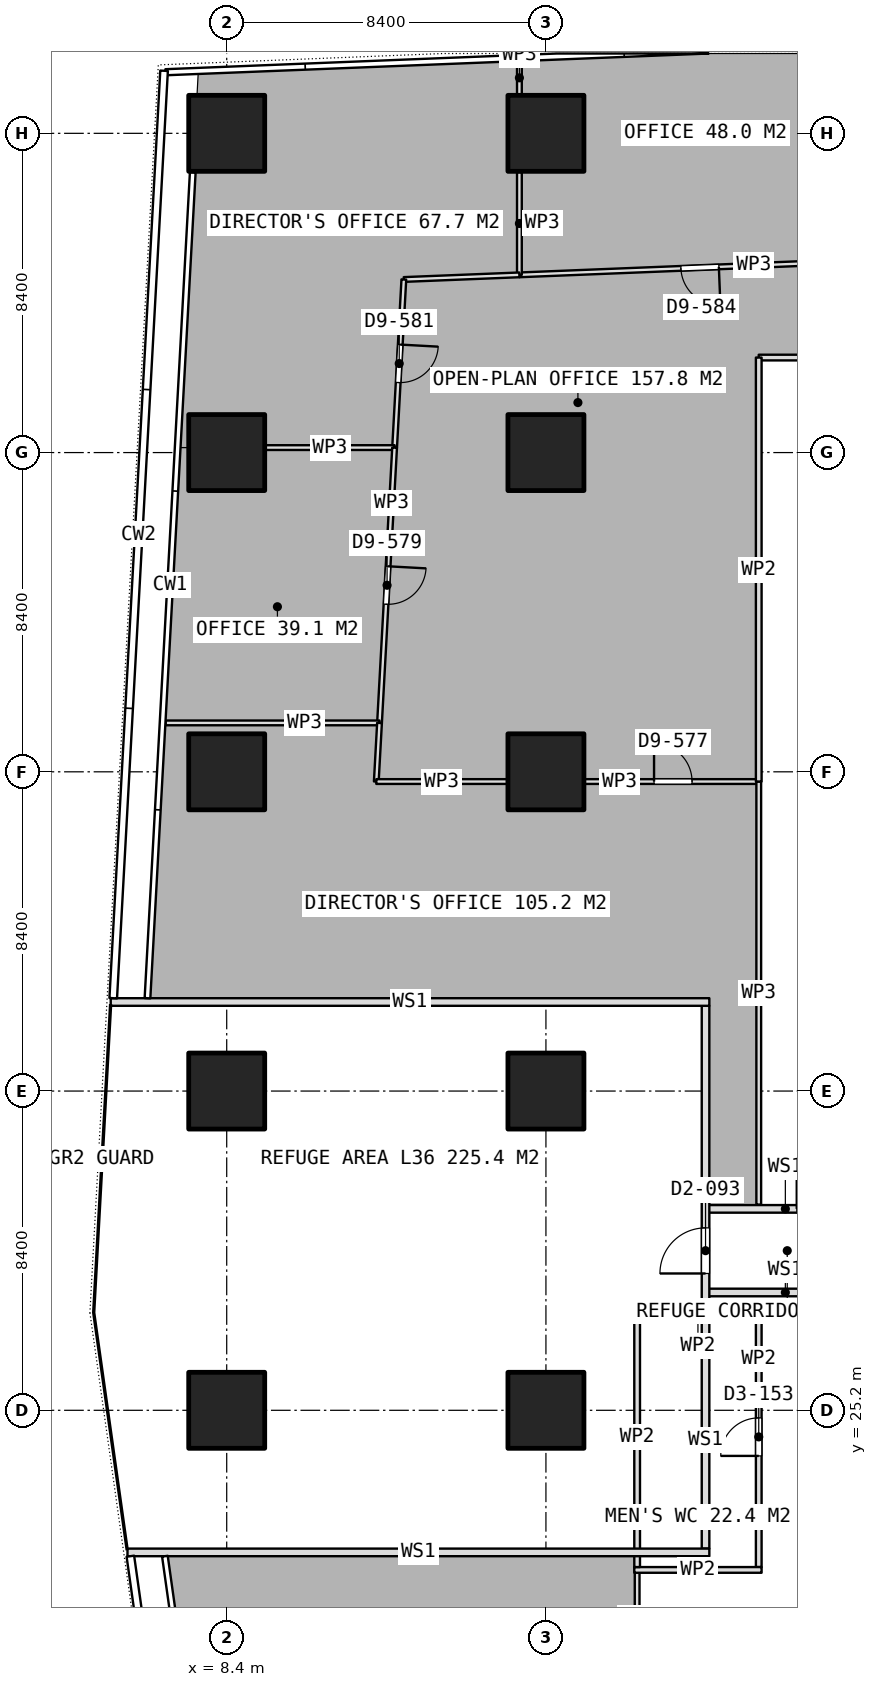
"""IFC4 building model, lengths in metres.
Left out: names, types, materials, properties, quantities, classifications, styles, units other than length and angle.
Written with IfcOpenShell. Run it as: python <this file> out.ifc"""

import sys

from ifc_helpers import new_model, si_unit, direction, frame, frame_2d, origin, origin_2d, place, context, subcontext, project, spatial, rectangle, extrude, element, fill, save


model = new_model("IFC4")
c1 = context("Model", 3, precision=1e-05, world=origin(), true_north=direction((0.0, 1.0)))
c2 = subcontext(c1, "Body", "Model", "MODEL_VIEW")
j1 = project(units=[si_unit("LENGTHUNIT", "METRE"), si_unit("PLANEANGLEUNIT", "RADIAN")], contexts=[c1])
p1 = place(None, origin())
s1 = spatial("IfcSite", under=j1, at=p1, CompositionType="ELEMENT")
p2 = place(p1, origin())
s2 = spatial("IfcBuilding", under=s1, at=p2, CompositionType="ELEMENT")
p3 = place(p2, frame((0.0, 0.0, 144.05)))
s3 = spatial("IfcBuildingStorey", under=s2, at=p3, CompositionType="ELEMENT", Elevation=144.05)
for number, where, z_axis, x_axis in (
    (1, (8.4, 25.2, 0.0), (0.0, 0.0, 1.0), (1.0, 0.0, 0.0)),
    (2, (8.4, 33.6, 0.0), (0.0, 0.0, 1.0), (1.0, 0.0, 0.0)),
    (3, (8.4, 42.0, 0.0), (0.0, 0.0, 1.0), (1.0, 0.0, 0.0)),
    (4, (8.4, 50.4, 0.0), (0.0, 0.0, 1.0), (1.0, 0.0, 0.0)),
    (5, (8.4, 58.8, 0.0), (0.0, 0.0, 1.0), (1.0, 0.0, 0.0)),
    (6, (16.8, 25.2, 0.0), (0.0, 0.0, 1.0), (1.0, 0.0, 0.0)),
    (7, (16.8, 33.6, 0.0), (0.0, 0.0, 1.0), (1.0, 0.0, 0.0)),
    (8, (16.8, 42.0, 0.0), (0.0, 0.0, 1.0), (1.0, 0.0, 0.0)),
    (9, (16.8, 50.4, 0.0), (0.0, 0.0, 1.0), (1.0, 0.0, 0.0)),
    (10, (16.8, 58.8, 0.0), (0.0, 0.0, 1.0), (1.0, 0.0, 0.0)),
):
    element("IfcColumn", number, at=place(p3, frame(where, z_axis=z_axis, x_axis=x_axis)), inside=s3, PredefinedType="COLUMN", context=c2, shape_type="SweptSolid", body=[
        extrude(rectangle(XDim=2.0, YDim=2.0, at=origin_2d()), origin(), (0.0, 0.0, 1.0), 3.75),
    ])
for number, where, z_axis, x_axis in (
    (11, (19.125, 21.0, 0.0), (0.0, 0.0, 1.0), (1.0, 0.0, 0.0)),
    (12, (19.125, 28.0, 0.0), (0.0, 0.0, 1.0), (1.0, 0.0, 0.0)),
):
    element("IfcWall", number, at=place(p3, frame(where, z_axis=z_axis, x_axis=x_axis)), inside=s3, PredefinedType="PARTITIONING", context=c2, shape_type="SweptSolid", body=[
        extrude(rectangle(XDim=3.35, YDim=0.15, at=frame_2d((1.675, 0.0))), origin(), (0.0, 0.0, 1.0), 3.5),
    ])
p4 = place(p3, frame((19.2, 21.075, 0.0), z_axis=(0.0, 0.0, 1.0), x_axis=(0.0, 1.0, 0.0)))
e13 = element("IfcWall", 13, at=p4, inside=s3, PredefinedType="PARTITIONING", context=c2, shape_type="SweptSolid", body=[
    extrude(rectangle(XDim=6.85, YDim=0.15, at=frame_2d((3.425, 0.0))), origin(), (0.0, 0.0, 1.0), 3.5),
])
p5 = place(p3, frame((22.4, 21.075, 0.0), z_axis=(0.0, 0.0, 1.0), x_axis=(0.0, 1.0, 0.0)))
e14 = element("IfcWall", 14, at=p5, inside=s3, PredefinedType="PARTITIONING", context=c2, shape_type="SweptSolid", body=[
    extrude(rectangle(XDim=6.85, YDim=0.15, at=frame_2d((3.425, 0.0))), origin(), (0.0, 0.0, 1.0), 3.5),
])
p6 = place(p5, frame((2.925, 0.0, 0.0)))
e15 = element("IfcOpeningElement", 15, at=p6, cuts=e14, PredefinedType="OPENING", context=c2, shape_type="SweptSolid", body=[
    extrude(rectangle(XDim=1.0, YDim=2.1, at=frame_2d((0.5, 1.05))), frame((0.0, 0.085, 0.0), z_axis=(0.0, -1.0, 0.0), x_axis=(1.0, 0.0, 0.0)), (0.0, 0.0, 1.0), 0.17),
])
p7 = place(p3, frame((19.2, 21.074, 0.0), z_axis=(0.0, 0.0, 1.0), x_axis=(0.0, -1.0, 0.0)))
e16 = element("IfcWall", 16, at=p7, inside=s3, PredefinedType="PARTITIONING", context=c2, shape_type="SweptSolid", body=[
    extrude(rectangle(XDim=2.674, YDim=0.125, at=frame_2d((1.337, 0.0))), origin(), (0.0, 0.0, 1.0), 3.5),
])
p8 = place(p3, frame((25.599, 55.457, 0.0), z_axis=(0.0, 0.0, 1.0), x_axis=(-0.999195821447, -0.040096264197, 0.0)))
e17 = element("IfcWall", 17, at=p8, inside=s3, PredefinedType="PARTITIONING", context=c2, shape_type="SweptSolid", body=[
    extrude(rectangle(XDim=9.505, YDim=0.125, at=frame_2d((4.752, 0.0))), origin(), (0.0, 0.0, 1.0), 3.5),
])
p9 = place(p8, frame((4.252, 0.0, 0.0)))
e18 = element("IfcOpeningElement", 18, at=p9, cuts=e17, PredefinedType="OPENING", context=c2, shape_type="SweptSolid", body=[
    extrude(rectangle(XDim=1.0, YDim=2.1, at=frame_2d((0.5, 1.05))), frame((0.0, 0.073, 0.0), z_axis=(0.0, -1.0, 0.0), x_axis=(1.0, 0.0, 0.0)), (0.0, 0.0, 1.0), 0.145),
])
p10 = place(p3, frame((16.102, 55.076, 0.0), z_axis=(0.0, 0.0, 1.0), x_axis=(0.0, 1.0, 0.0)))
e19 = element("IfcWall", 19, at=p10, inside=s3, PredefinedType="PARTITIONING", context=c2, shape_type="SweptSolid", body=[
    extrude(rectangle(XDim=2.704, YDim=0.125, at=frame_2d((1.352, 0.0))), origin(), (0.0, 0.0, 1.0), 3.5),
])
p11 = place(p3, frame((16.102, 59.82, 0.0), z_axis=(0.0, 0.0, 1.0), x_axis=(0.0, 1.0, 0.0)))
e20 = element("IfcWall", 20, at=p11, inside=s3, PredefinedType="PARTITIONING", context=c2, shape_type="SweptSolid", body=[
    extrude(rectangle(XDim=0.88, YDim=0.125, at=frame_2d((0.44, 0.0))), origin(), (0.0, 0.0, 1.0), 3.5),
])
p12 = place(p3, frame((16.101, 55.076, 0.0), z_axis=(0.0, 0.0, 1.0), x_axis=(-0.999198007742, -0.040041744769, 0.0)))
e21 = element("IfcWall", 21, at=p12, inside=s3, PredefinedType="PARTITIONING", context=c2, shape_type="SweptSolid", body=[
    extrude(rectangle(XDim=3.042, YDim=0.125, at=frame_2d((1.521, 0.0))), origin(), (0.0, 0.0, 1.0), 3.5),
])
p13 = place(p3, frame((13.061, 54.954, 0.0), z_axis=(0.0, 0.0, 1.0), x_axis=(-0.054838150919, -0.998495256475, 0.0)))
e22 = element("IfcWall", 22, at=p13, inside=s3, PredefinedType="PARTITIONING", context=c2, shape_type="SweptSolid", body=[
    extrude(rectangle(XDim=4.43, YDim=0.125, at=frame_2d((2.215, 0.0))), origin(), (0.0, 0.0, 1.0), 3.5),
])
p14 = place(p13, frame((1.715, 0.0, 0.0)))
e23 = element("IfcOpeningElement", 23, at=p14, cuts=e22, PredefinedType="OPENING", context=c2, shape_type="SweptSolid", body=[
    extrude(rectangle(XDim=1.0, YDim=2.1, at=frame_2d((0.5, 1.05))), frame((0.0, 0.073, 0.0), z_axis=(0.0, -1.0, 0.0), x_axis=(1.0, 0.0, 0.0)), (0.0, 0.0, 1.0), 0.145),
])
p15 = place(p3, frame((12.818, 50.531, 0.0), z_axis=(0.0, 0.0, 1.0), x_axis=(-1.0, 0.0, 0.0)))
e24 = element("IfcWall", 24, at=p15, inside=s3, PredefinedType="PARTITIONING", context=c2, shape_type="SweptSolid", body=[
    extrude(rectangle(XDim=3.398, YDim=0.125, at=frame_2d((1.699, 0.0))), origin(), (0.0, 0.0, 1.0), 3.5),
])
p16 = place(p3, frame((12.818, 50.53, 0.0), z_axis=(0.0, 0.0, 1.0), x_axis=(-0.054759793003, -0.99849955687, 0.0)))
e25 = element("IfcWall", 25, at=p16, inside=s3, PredefinedType="PARTITIONING", context=c2, shape_type="SweptSolid", body=[
    extrude(rectangle(XDim=7.254, YDim=0.125, at=frame_2d((3.627, 0.0))), origin(), (0.0, 0.0, 1.0), 3.5),
])
p17 = place(p16, frame((3.127, 0.0, 0.0)))
e26 = element("IfcOpeningElement", 26, at=p17, cuts=e25, PredefinedType="OPENING", context=c2, shape_type="SweptSolid", body=[
    extrude(rectangle(XDim=1.0, YDim=2.1, at=frame_2d((0.5, 1.05))), frame((0.0, 0.073, 0.0), z_axis=(0.0, -1.0, 0.0), x_axis=(1.0, 0.0, 0.0)), (0.0, 0.0, 1.0), 0.145),
])
p18 = place(p3, frame((12.421, 43.287, 0.0), z_axis=(0.0, 0.0, 1.0), x_axis=(-1.0, 0.0, 0.0)))
e27 = element("IfcWall", 27, at=p18, inside=s3, PredefinedType="PARTITIONING", context=c2, shape_type="SweptSolid", body=[
    extrude(rectangle(XDim=5.628, YDim=0.125, at=frame_2d((2.814, 0.0))), origin(), (0.0, 0.0, 1.0), 3.5),
])
p19 = place(p3, frame((12.421, 43.286, 0.0), z_axis=(0.0, 0.0, 1.0), x_axis=(-0.055014719624, -0.998485543523, 0.0)))
e28 = element("IfcWall", 28, at=p19, inside=s3, PredefinedType="PARTITIONING", context=c2, shape_type="SweptSolid", body=[
    extrude(rectangle(XDim=1.544, YDim=0.125, at=frame_2d((0.772, 0.0))), origin(), (0.0, 0.0, 1.0), 3.5),
])
p20 = place(p3, frame((12.336, 41.744, 0.0), z_axis=(0.0, 0.0, 1.0), x_axis=(1.0, 0.0, 0.0)))
e29 = element("IfcWall", 29, at=p20, inside=s3, PredefinedType="PARTITIONING", context=c2, shape_type="SweptSolid", body=[
    extrude(rectangle(XDim=3.444, YDim=0.125, at=frame_2d((1.722, 0.0))), origin(), (0.0, 0.0, 1.0), 3.5),
])
p21 = place(p3, frame((17.82, 41.744, 0.0), z_axis=(0.0, 0.0, 1.0), x_axis=(1.0, 0.0, 0.0)))
e30 = element("IfcWall", 30, at=p21, inside=s3, PredefinedType="PARTITIONING", context=c2, shape_type="SweptSolid", body=[
    extrude(rectangle(XDim=4.58, YDim=0.125, at=frame_2d((2.29, 0.0))), origin(), (0.0, 0.0, 1.0), 3.5),
])
p22 = place(p21, frame((1.825, 0.0, 0.0)))
e31 = element("IfcOpeningElement", 31, at=p22, cuts=e30, PredefinedType="OPENING", context=c2, shape_type="SweptSolid", body=[
    extrude(rectangle(XDim=1.0, YDim=2.1, at=frame_2d((0.5, 1.05))), frame((0.0, 0.073, 0.0), z_axis=(0.0, -1.0, 0.0), x_axis=(1.0, 0.0, 0.0)), (0.0, 0.0, 1.0), 0.145),
])
p23 = place(p3, frame((22.4, 41.744, 0.0), z_axis=(0.0, 0.0, 1.0), x_axis=(0.0, -1.0, 0.0)))
e32 = element("IfcWall", 32, at=p23, inside=s3, PredefinedType="PARTITIONING", context=c2, shape_type="SweptSolid", body=[
    extrude(rectangle(XDim=11.133, YDim=0.125, at=frame_2d((5.566, 0.0))), origin(), (0.0, 0.0, 1.0), 3.5),
])
p24 = place(p3, frame((33.826, 52.9, 0.0), z_axis=(0.0, 0.0, 1.0), x_axis=(-1.0, 0.0, 0.0)))
e33 = element("IfcWall", 33, at=p24, inside=s3, PredefinedType="PARTITIONING", context=c2, shape_type="SweptSolid", body=[
    extrude(rectangle(XDim=11.426, YDim=0.15, at=frame_2d((5.713, 0.0))), origin(), (0.0, 0.0, 1.0), 3.5),
])
p25 = place(p24, frame((5.213, 0.0, 0.0)))
e34 = element("IfcOpeningElement", 34, at=p25, cuts=e33, PredefinedType="OPENING", context=c2, shape_type="SweptSolid", body=[
    extrude(rectangle(XDim=1.0, YDim=2.1, at=frame_2d((0.5, 1.05))), frame((0.0, 0.085, 0.0), z_axis=(0.0, -1.0, 0.0), x_axis=(1.0, 0.0, 0.0)), (0.0, 0.0, 1.0), 0.17),
])
p26 = place(p3, frame((22.4, 52.9, 0.0), z_axis=(0.0, 0.0, 1.0), x_axis=(0.0, -1.0, 0.0)))
e35 = element("IfcWall", 35, at=p26, inside=s3, PredefinedType="PARTITIONING", context=c2, shape_type="SweptSolid", body=[
    extrude(rectangle(XDim=11.156, YDim=0.15, at=frame_2d((5.578, 0.0))), origin(), (0.0, 0.0, 1.0), 3.5),
])
p27 = place(p3, frame((21.0, 21.561, 0.0), z_axis=(0.0, 0.0, 1.0), x_axis=(0.0, 1.0, 0.0)))
e36 = element("IfcWall", 36, at=p27, inside=s3, PredefinedType="PARTITIONING", context=c2, shape_type="SweptSolid", body=[
    extrude(rectangle(XDim=14.282, YDim=0.2, at=frame_2d((7.141, 0.0))), origin(), (0.0, 0.0, 1.0), 3.5),
])
p28 = place(p27, frame((7.239, 0.0, 0.0)))
e37 = element("IfcOpeningElement", 37, at=p28, cuts=e36, PredefinedType="OPENING", context=c2, shape_type="SweptSolid", body=[
    extrude(rectangle(XDim=1.2, YDim=2.1, at=frame_2d((0.6, 1.05))), frame((0.0, 0.11, 0.0), z_axis=(0.0, -1.0, 0.0), x_axis=(1.0, 0.0, 0.0)), (0.0, 0.0, 1.0), 0.22),
])
p29 = place(p3, frame((5.789, 21.461, 0.0), z_axis=(0.0, 0.0, 1.0), x_axis=(1.0, 0.0, 0.0)))
e38 = element("IfcWall", 38, at=p29, inside=s3, PredefinedType="PARTITIONING", context=c2, shape_type="SweptSolid", body=[
    extrude(rectangle(XDim=15.311, YDim=0.2, at=frame_2d((7.656, 0.0))), origin(), (0.0, 0.0, 1.0), 3.5),
])
p30 = place(p3, frame((5.348, 35.943, 0.0), z_axis=(0.0, 0.0, 1.0), x_axis=(1.0, 0.0, 0.0)))
e39 = element("IfcWall", 39, at=p30, inside=s3, PredefinedType="PARTITIONING", context=c2, shape_type="SweptSolid", body=[
    extrude(rectangle(XDim=15.752, YDim=0.2, at=frame_2d((7.876, 0.0))), origin(), (0.0, 0.0, 1.0), 3.5),
])
p31 = place(p3, frame((21.0, 30.5, 0.0), z_axis=(0.0, 0.0, 1.0), x_axis=(1.0, 0.0, 0.0)))
e40 = element("IfcWall", 40, at=p31, inside=s3, PredefinedType="PARTITIONING", context=c2, shape_type="SweptSolid", body=[
    extrude(rectangle(XDim=4.2, YDim=0.2, at=frame_2d((2.1, 0.0))), origin(), (0.0, 0.0, 1.0), 3.5),
])
p32 = place(p31, frame((2.4, 0.0, 0.0)))
e41 = element("IfcOpeningElement", 41, at=p32, cuts=e40, PredefinedType="OPENING", context=c2, shape_type="SweptSolid", body=[
    extrude(rectangle(XDim=1.2, YDim=2.1, at=frame_2d((0.6, 1.05))), frame((0.0, 0.11, 0.0), z_axis=(0.0, -1.0, 0.0), x_axis=(1.0, 0.0, 0.0)), (0.0, 0.0, 1.0), 0.22),
])
p33 = place(p3, frame((21.0, 28.3, 0.0), z_axis=(0.0, 0.0, 1.0), x_axis=(1.0, 0.0, 0.0)))
e42 = element("IfcWall", 42, at=p33, inside=s3, PredefinedType="PARTITIONING", context=c2, shape_type="SweptSolid", body=[
    extrude(rectangle(XDim=4.2, YDim=0.2, at=frame_2d((2.1, 0.0))), origin(), (0.0, 0.0, 1.0), 3.5),
])
p34 = place(p6, origin())
e43 = element("IfcDoor", 43, at=p34, inside=s3, OperationType="SINGLE_SWING_LEFT", PredefinedType="DOOR", context=c2, shape_type="SweptSolid", body=[
    extrude(rectangle(XDim=1.0, YDim=2.1, at=frame_2d((0.5, 1.05))), frame((0.0, 0.025, 0.0), z_axis=(0.0, -1.0, 0.0), x_axis=(1.0, 0.0, 0.0)), (0.0, 0.0, 1.0), 0.05),
])
fill(e15, e43)
p35 = place(p9, origin())
e44 = element("IfcDoor", 44, at=p35, inside=s3, OperationType="SINGLE_SWING_LEFT", PredefinedType="DOOR", context=c2, shape_type="SweptSolid", body=[
    extrude(rectangle(XDim=1.0, YDim=2.1, at=frame_2d((0.5, 1.05))), frame((0.0, 0.025, 0.0), z_axis=(0.0, -1.0, 0.0), x_axis=(1.0, 0.0, 0.0)), (0.0, 0.0, 1.0), 0.05),
])
fill(e18, e44)
p36 = place(p14, origin())
e45 = element("IfcDoor", 45, at=p36, inside=s3, OperationType="SINGLE_SWING_LEFT", PredefinedType="DOOR", context=c2, shape_type="SweptSolid", body=[
    extrude(rectangle(XDim=1.0, YDim=2.1, at=frame_2d((0.5, 1.05))), frame((0.0, 0.025, 0.0), z_axis=(0.0, -1.0, 0.0), x_axis=(1.0, 0.0, 0.0)), (0.0, 0.0, 1.0), 0.05),
])
fill(e23, e45)
p37 = place(p17, origin())
e46 = element("IfcDoor", 46, at=p37, inside=s3, OperationType="SINGLE_SWING_LEFT", PredefinedType="DOOR", context=c2, shape_type="SweptSolid", body=[
    extrude(rectangle(XDim=1.0, YDim=2.1, at=frame_2d((0.5, 1.05))), frame((0.0, 0.025, 0.0), z_axis=(0.0, -1.0, 0.0), x_axis=(1.0, 0.0, 0.0)), (0.0, 0.0, 1.0), 0.05),
])
fill(e26, e46)
p38 = place(p22, origin())
e47 = element("IfcDoor", 47, at=p38, inside=s3, OperationType="SINGLE_SWING_LEFT", PredefinedType="DOOR", context=c2, shape_type="SweptSolid", body=[
    extrude(rectangle(XDim=1.0, YDim=2.1, at=frame_2d((0.5, 1.05))), frame((0.0, 0.025, 0.0), z_axis=(0.0, -1.0, 0.0), x_axis=(1.0, 0.0, 0.0)), (0.0, 0.0, 1.0), 0.05),
])
fill(e31, e47)
p39 = place(p28, origin())
e48 = element("IfcDoor", 48, at=p39, inside=s3, OperationType="SINGLE_SWING_LEFT", PredefinedType="DOOR", context=c2, shape_type="SweptSolid", body=[
    extrude(rectangle(XDim=1.2, YDim=2.1, at=frame_2d((0.6, 1.05))), frame((0.0, 0.025, 0.0), z_axis=(0.0, -1.0, 0.0), x_axis=(1.0, 0.0, 0.0)), (0.0, 0.0, 1.0), 0.05),
])
fill(e37, e48)
save(model, sys.argv[1])
